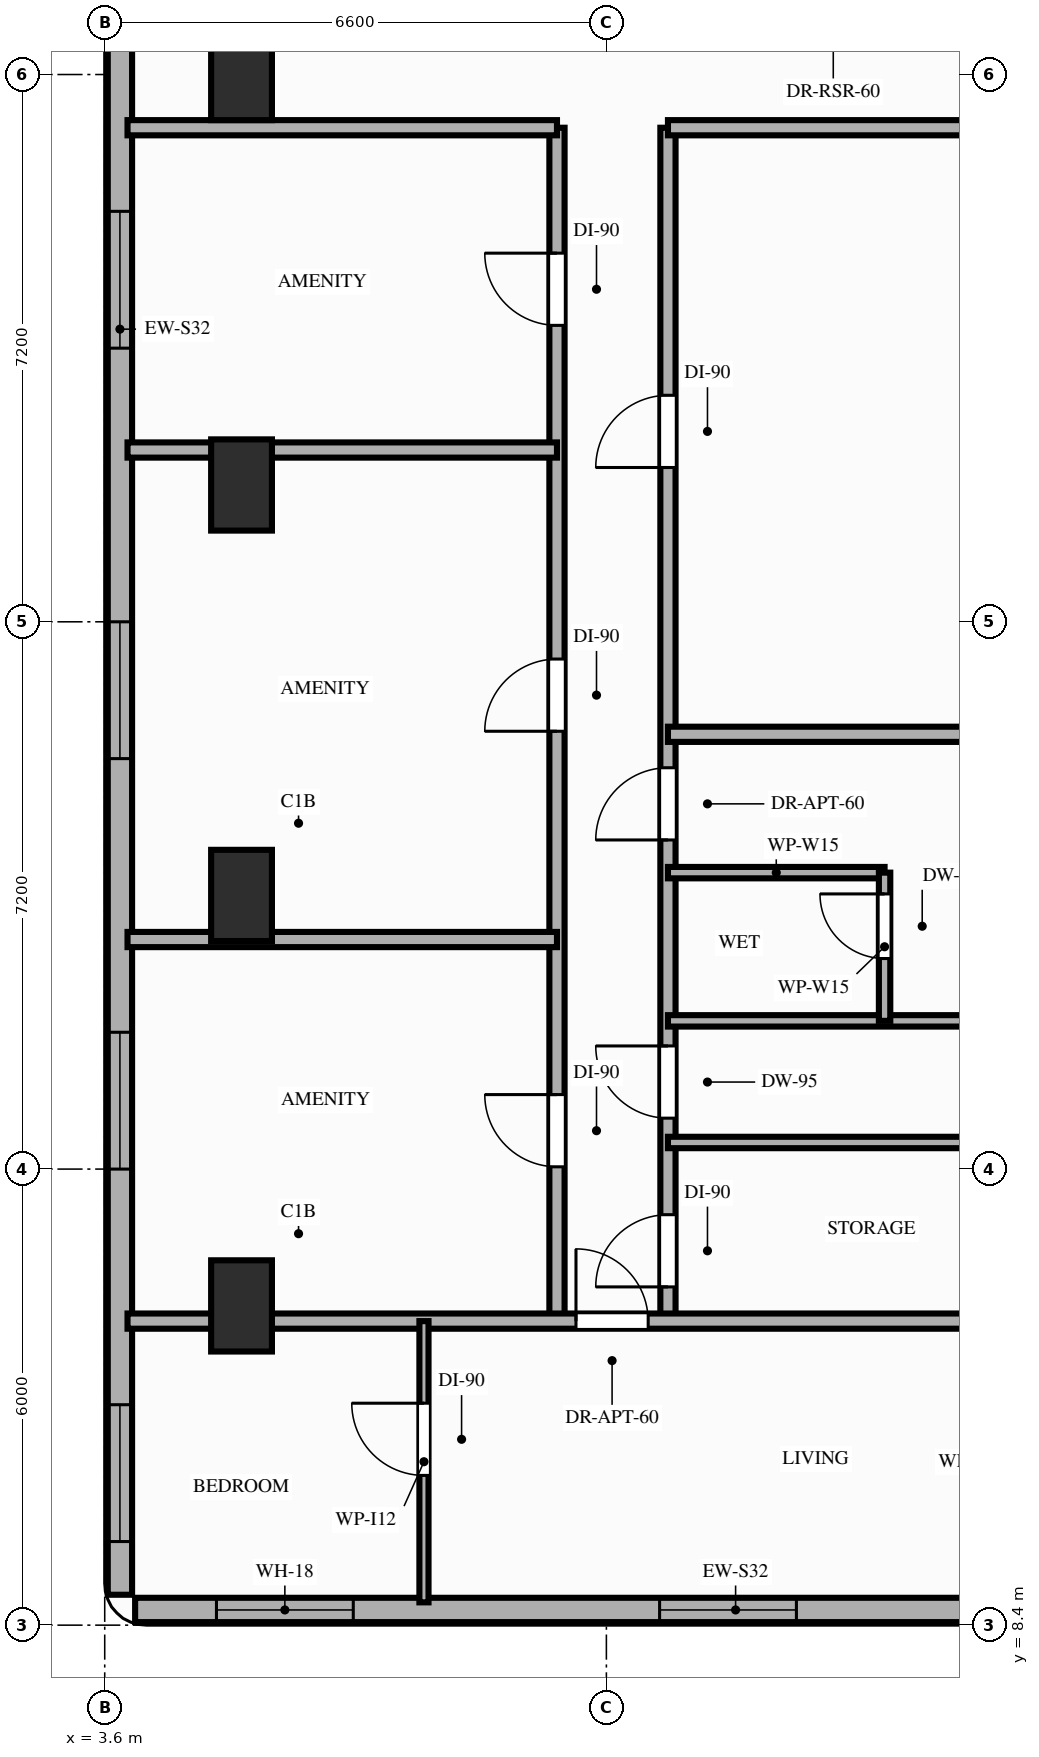
"""IFC4 building model, lengths in metres.
Left out: names, types, materials, properties, quantities, classifications, styles, units other than length and angle.
Written with IfcOpenShell. Run it as: python <this file> out.ifc"""

import sys

from ifc_helpers import new_model, si_unit, direction, frame, frame_2d, origin, origin_2d, place, context, subcontext, project, spatial, rectangle, extrude, element, fill, save


model = new_model("IFC4")
c1 = context("Model", 3, precision=1e-05, world=origin(), true_north=direction((0.0, 1.0)))
c2 = subcontext(c1, "Body", "Model", "MODEL_VIEW")
j1 = project(units=[si_unit("LENGTHUNIT", "METRE"), si_unit("PLANEANGLEUNIT", "RADIAN")], contexts=[c1])
p1 = place(None, origin())
s1 = spatial("IfcSite", under=j1, at=p1, CompositionType="ELEMENT")
p2 = place(p1, origin())
s2 = spatial("IfcBuilding", under=s1, at=p2, CompositionType="ELEMENT")
p3 = place(p2, frame((0.0, 0.0, 102.6)))
s3 = spatial("IfcBuildingStorey", under=s2, at=p3, CompositionType="ELEMENT", Elevation=102.6)
for number, where, z_axis, x_axis in (
    (1, (5.4, 12.6, 0.0), (0.0, 0.0, 1.0), (1.0, 0.0, 0.0)),
    (2, (5.4, 18.0, 0.0), (0.0, 0.0, 1.0), (1.0, 0.0, 0.0)),
    (3, (5.4, 23.4, 0.0), (0.0, 0.0, 1.0), (1.0, 0.0, 0.0)),
    (4, (5.4, 28.8, 0.0), (0.0, 0.0, 1.0), (1.0, 0.0, 0.0)),
):
    element("IfcColumn", number, at=place(p3, frame(where, z_axis=z_axis, x_axis=x_axis)), inside=s3, PredefinedType="COLUMN", context=c2, shape_type="SweptSolid", body=[
        extrude(rectangle(XDim=0.8, YDim=1.2, at=origin_2d()), origin(), (0.0, 0.0, 1.0), 4.8),
    ])
p4 = place(p3, frame((4.0, 8.6, 0.0), z_axis=(0.0, 0.0, 1.0), x_axis=(1.0, 0.0, 0.0)))
e5 = element("IfcWall", 5, at=p4, inside=s3, PredefinedType="STANDARD", context=c2, shape_type="SweptSolid", body=[
    extrude(rectangle(XDim=15.8, YDim=0.32, at=frame_2d((7.9, 0.0))), origin(), (0.0, 0.0, 1.0), 4.56),
])
p5 = place(p4, frame((1.07, 0.0, 0.85)))
e6 = element("IfcOpeningElement", 6, at=p5, cuts=e5, PredefinedType="OPENING", context=c2, shape_type="SweptSolid", body=[
    extrude(rectangle(XDim=1.8, YDim=1.75, at=frame_2d((0.9, 0.875))), frame((0.0, 0.17, 0.0), z_axis=(0.0, -1.0, 0.0), x_axis=(1.0, 0.0, 0.0)), (0.0, 0.0, 1.0), 0.34),
])
p6 = place(p4, frame((6.9, 0.0, 0.85)))
e7 = element("IfcOpeningElement", 7, at=p6, cuts=e5, PredefinedType="OPENING", context=c2, shape_type="SweptSolid", body=[
    extrude(rectangle(XDim=1.8, YDim=1.75, at=frame_2d((0.9, 0.875))), frame((0.0, 0.17, 0.0), z_axis=(0.0, -1.0, 0.0), x_axis=(1.0, 0.0, 0.0)), (0.0, 0.0, 1.0), 0.34),
])
p7 = place(p3, frame((3.8, 42.1, 0.0), z_axis=(0.0, 0.0, 1.0), x_axis=(0.0, -1.0, 0.0)))
e8 = element("IfcWall", 8, at=p7, inside=s3, PredefinedType="STANDARD", context=c2, shape_type="SweptSolid", body=[
    extrude(rectangle(XDim=33.3, YDim=0.32, at=frame_2d((16.65, 0.0))), origin(), (0.0, 0.0, 1.0), 4.26),
])
p8 = place(p7, frame((30.8, 0.0, 0.85)))
e9 = element("IfcOpeningElement", 9, at=p8, cuts=e8, PredefinedType="OPENING", context=c2, shape_type="SweptSolid", body=[
    extrude(rectangle(XDim=1.8, YDim=1.75, at=frame_2d((0.9, 0.875))), frame((0.0, 0.17, 0.0), z_axis=(0.0, -1.0, 0.0), x_axis=(1.0, 0.0, 0.0)), (0.0, 0.0, 1.0), 0.34),
])
p9 = place(p7, frame((25.9, 0.0, 0.85)))
e10 = element("IfcOpeningElement", 10, at=p9, cuts=e8, PredefinedType="OPENING", context=c2, shape_type="SweptSolid", body=[
    extrude(rectangle(XDim=1.8, YDim=1.75, at=frame_2d((0.9, 0.875))), frame((0.0, 0.17, 0.0), z_axis=(0.0, -1.0, 0.0), x_axis=(1.0, 0.0, 0.0)), (0.0, 0.0, 1.0), 0.34),
])
p10 = place(p7, frame((20.5, 0.0, 0.85)))
e11 = element("IfcOpeningElement", 11, at=p10, cuts=e8, PredefinedType="OPENING", context=c2, shape_type="SweptSolid", body=[
    extrude(rectangle(XDim=1.8, YDim=1.75, at=frame_2d((0.9, 0.875))), frame((0.0, 0.17, 0.0), z_axis=(0.0, -1.0, 0.0), x_axis=(1.0, 0.0, 0.0)), (0.0, 0.0, 1.0), 0.34),
])
p11 = place(p7, frame((15.1, 0.0, 0.85)))
e12 = element("IfcOpeningElement", 12, at=p11, cuts=e8, PredefinedType="OPENING", context=c2, shape_type="SweptSolid", body=[
    extrude(rectangle(XDim=1.8, YDim=1.75, at=frame_2d((0.9, 0.875))), frame((0.0, 0.17, 0.0), z_axis=(0.0, -1.0, 0.0), x_axis=(1.0, 0.0, 0.0)), (0.0, 0.0, 1.0), 0.34),
])
p12 = place(p7, frame((9.9, 0.0, 0.85)))
e13 = element("IfcOpeningElement", 13, at=p12, cuts=e8, PredefinedType="OPENING", context=c2, shape_type="SweptSolid", body=[
    extrude(rectangle(XDim=1.8, YDim=1.75, at=frame_2d((0.9, 0.875))), frame((0.0, 0.17, 0.0), z_axis=(0.0, -1.0, 0.0), x_axis=(1.0, 0.0, 0.0)), (0.0, 0.0, 1.0), 0.34),
])
p13 = place(p7, frame((3.8, 0.0, 0.85)))
e14 = element("IfcOpeningElement", 14, at=p13, cuts=e8, PredefinedType="OPENING", context=c2, shape_type="SweptSolid", body=[
    extrude(rectangle(XDim=1.8, YDim=1.75, at=frame_2d((0.9, 0.875))), frame((0.0, 0.17, 0.0), z_axis=(0.0, -1.0, 0.0), x_axis=(1.0, 0.0, 0.0)), (0.0, 0.0, 1.0), 0.34),
])
p14 = place(p3, frame((9.55, 12.4, 0.0), z_axis=(0.0, 0.0, 1.0), x_axis=(0.0, 1.0, 0.0)))
e15 = element("IfcWall", 15, at=p14, inside=s3, PredefinedType="PARTITIONING", context=c2, shape_type="SweptSolid", body=[
    extrude(rectangle(XDim=15.7, YDim=0.2, at=frame_2d((7.85, 0.0))), origin(), (0.0, 0.0, 1.0), 3.95),
])
p15 = place(p14, frame((2.03, 0.0, 0.0)))
e16 = element("IfcOpeningElement", 16, at=p15, cuts=e15, PredefinedType="OPENING", context=c2, shape_type="SweptSolid", body=[
    extrude(rectangle(XDim=0.95, YDim=2.15, at=frame_2d((0.475, 1.075))), frame((0.0, 0.11, 0.0), z_axis=(0.0, -1.0, 0.0), x_axis=(1.0, 0.0, 0.0)), (0.0, 0.0, 1.0), 0.22),
])
p16 = place(p14, frame((7.76, 0.0, 0.0)))
e17 = element("IfcOpeningElement", 17, at=p16, cuts=e15, PredefinedType="OPENING", context=c2, shape_type="SweptSolid", body=[
    extrude(rectangle(XDim=0.95, YDim=2.15, at=frame_2d((0.475, 1.075))), frame((0.0, 0.11, 0.0), z_axis=(0.0, -1.0, 0.0), x_axis=(1.0, 0.0, 0.0)), (0.0, 0.0, 1.0), 0.22),
])
p17 = place(p14, frame((13.1, 0.0, 0.0)))
e18 = element("IfcOpeningElement", 18, at=p17, cuts=e15, PredefinedType="OPENING", context=c2, shape_type="SweptSolid", body=[
    extrude(rectangle(XDim=0.95, YDim=2.15, at=frame_2d((0.475, 1.075))), frame((0.0, 0.11, 0.0), z_axis=(0.0, -1.0, 0.0), x_axis=(1.0, 0.0, 0.0)), (0.0, 0.0, 1.0), 0.22),
])
p18 = place(p3, frame((11.01, 12.4, 0.0), z_axis=(0.0, 0.0, 1.0), x_axis=(0.0, 1.0, 0.0)))
e19 = element("IfcWall", 19, at=p18, inside=s3, PredefinedType="PARTITIONING", context=c2, shape_type="SweptSolid", body=[
    extrude(rectangle(XDim=15.7, YDim=0.2, at=frame_2d((7.85, 0.0))), origin(), (0.0, 0.0, 1.0), 3.95),
])
p19 = place(p18, frame((0.45, 0.0, 0.0)))
e20 = element("IfcOpeningElement", 20, at=p19, cuts=e19, PredefinedType="OPENING", context=c2, shape_type="SweptSolid", body=[
    extrude(rectangle(XDim=0.95, YDim=2.15, at=frame_2d((0.475, 1.075))), frame((0.0, 0.11, 0.0), z_axis=(0.0, -1.0, 0.0), x_axis=(1.0, 0.0, 0.0)), (0.0, 0.0, 1.0), 0.22),
])
p20 = place(p18, frame((2.67, 0.0, 0.0)))
e21 = element("IfcOpeningElement", 21, at=p20, cuts=e19, PredefinedType="OPENING", context=c2, shape_type="SweptSolid", body=[
    extrude(rectangle(XDim=0.95, YDim=2.1, at=frame_2d((0.475, 1.05))), frame((0.0, 0.11, 0.0), z_axis=(0.0, -1.0, 0.0), x_axis=(1.0, 0.0, 0.0)), (0.0, 0.0, 1.0), 0.22),
])
p21 = place(p18, frame((11.23, 0.0, 0.0)))
e22 = element("IfcOpeningElement", 22, at=p21, cuts=e19, PredefinedType="OPENING", context=c2, shape_type="SweptSolid", body=[
    extrude(rectangle(XDim=0.95, YDim=2.15, at=frame_2d((0.475, 1.075))), frame((0.0, 0.11, 0.0), z_axis=(0.0, -1.0, 0.0), x_axis=(1.0, 0.0, 0.0)), (0.0, 0.0, 1.0), 0.22),
])
p22 = place(p18, frame((6.33, 0.0, 0.0)))
e23 = element("IfcOpeningElement", 23, at=p22, cuts=e19, PredefinedType="OPENING", context=c2, shape_type="SweptSolid", body=[
    extrude(rectangle(XDim=0.95, YDim=2.15, at=frame_2d((0.475, 1.075))), frame((0.0, 0.11, 0.0), z_axis=(0.0, -1.0, 0.0), x_axis=(1.0, 0.0, 0.0)), (0.0, 0.0, 1.0), 0.22),
])
p23 = place(p3, frame((3.9, 12.4, 0.0), z_axis=(0.0, 0.0, 1.0), x_axis=(1.0, 0.0, 0.0)))
e24 = element("IfcWall", 24, at=p23, inside=s3, PredefinedType="PARTITIONING", context=c2, shape_type="SweptSolid", body=[
    extrude(rectangle(XDim=16.0, YDim=0.2, at=frame_2d((8.0, 0.0))), origin(), (0.0, 0.0, 1.0), 3.95),
])
p24 = place(p23, frame((5.9, 0.0, 0.0)))
e25 = element("IfcOpeningElement", 25, at=p24, cuts=e24, PredefinedType="OPENING", context=c2, shape_type="SweptSolid", body=[
    extrude(rectangle(XDim=0.95, YDim=2.15, at=frame_2d((0.475, 1.075))), frame((0.0, 0.11, 0.0), z_axis=(0.0, -1.0, 0.0), x_axis=(1.0, 0.0, 0.0)), (0.0, 0.0, 1.0), 0.22),
])
p25 = place(p3, frame((3.9, 28.1, 0.0), z_axis=(0.0, 0.0, 1.0), x_axis=(1.0, 0.0, 0.0)))
e26 = element("IfcWall", 26, at=p25, inside=s3, PredefinedType="PARTITIONING", context=c2, shape_type="SweptSolid", body=[
    extrude(rectangle(XDim=5.65, YDim=0.2, at=frame_2d((2.825, 0.0))), origin(), (0.0, 0.0, 1.0), 3.95),
])
p26 = place(p3, frame((11.01, 28.1, 0.0), z_axis=(0.0, 0.0, 1.0), x_axis=(1.0, 0.0, 0.0)))
e27 = element("IfcWall", 27, at=p26, inside=s3, PredefinedType="PARTITIONING", context=c2, shape_type="SweptSolid", body=[
    extrude(rectangle(XDim=8.89, YDim=0.2, at=frame_2d((4.445, 0.0))), origin(), (0.0, 0.0, 1.0), 3.95),
])
for number, where, z_axis, x_axis in (
    (28, (3.9, 17.42, 0.0), (0.0, 0.0, 1.0), (1.0, 0.0, 0.0)),
    (29, (3.9, 23.86, 0.0), (0.0, 0.0, 1.0), (1.0, 0.0, 0.0)),
):
    element("IfcWall", number, at=place(p3, frame(where, z_axis=z_axis, x_axis=x_axis)), inside=s3, PredefinedType="PARTITIONING", context=c2, shape_type="SweptSolid", body=[
        extrude(rectangle(XDim=5.65, YDim=0.2, at=frame_2d((2.825, 0.0))), origin(), (0.0, 0.0, 1.0), 3.95),
    ])
p27 = place(p3, frame((7.8, 8.7, 0.0), z_axis=(0.0, 0.0, 1.0), x_axis=(0.0, 1.0, 0.0)))
e30 = element("IfcWall", 30, at=p27, inside=s3, PredefinedType="PARTITIONING", context=c2, shape_type="SweptSolid", body=[
    extrude(rectangle(XDim=3.7, YDim=0.12, at=frame_2d((1.85, 0.0))), origin(), (0.0, 0.0, 1.0), 3.95),
])
p28 = place(p27, frame((1.67, 0.0, 0.0)))
e31 = element("IfcOpeningElement", 31, at=p28, cuts=e30, PredefinedType="OPENING", context=c2, shape_type="SweptSolid", body=[
    extrude(rectangle(XDim=0.95, YDim=2.15, at=frame_2d((0.475, 1.075))), frame((0.0, 0.07, 0.0), z_axis=(0.0, -1.0, 0.0), x_axis=(1.0, 0.0, 0.0)), (0.0, 0.0, 1.0), 0.14),
])
for number, where, z_axis, x_axis in (
    (32, (11.01, 14.75, 0.0), (0.0, 0.0, 1.0), (1.0, 0.0, 0.0)),
    (33, (11.01, 16.35, 0.0), (0.0, 0.0, 1.0), (1.0, 0.0, 0.0)),
):
    element("IfcWall", number, at=place(p3, frame(where, z_axis=z_axis, x_axis=x_axis)), inside=s3, PredefinedType="PARTITIONING", context=c2, shape_type="SweptSolid", body=[
        extrude(rectangle(XDim=8.89, YDim=0.15, at=frame_2d((4.445, 0.0))), origin(), (0.0, 0.0, 1.0), 3.95),
    ])
p29 = place(p3, frame((11.01, 20.12, 0.0), z_axis=(0.0, 0.0, 1.0), x_axis=(1.0, 0.0, 0.0)))
e34 = element("IfcWall", 34, at=p29, inside=s3, PredefinedType="PARTITIONING", context=c2, shape_type="SweptSolid", body=[
    extrude(rectangle(XDim=8.89, YDim=0.2, at=frame_2d((4.445, 0.0))), origin(), (0.0, 0.0, 1.0), 3.95),
])
p30 = place(p3, frame((11.01, 18.3, 0.0), z_axis=(0.0, 0.0, 1.0), x_axis=(1.0, 0.0, 0.0)))
e35 = element("IfcWall", 35, at=p30, inside=s3, PredefinedType="PARTITIONING", context=c2, shape_type="SweptSolid", body=[
    extrude(rectangle(XDim=2.85, YDim=0.15, at=frame_2d((1.425, 0.0))), origin(), (0.0, 0.0, 1.0), 3.95),
])
p31 = place(p3, frame((13.86, 16.35, 0.0), z_axis=(0.0, 0.0, 1.0), x_axis=(0.0, 1.0, 0.0)))
e36 = element("IfcWall", 36, at=p31, inside=s3, PredefinedType="PARTITIONING", context=c2, shape_type="SweptSolid", body=[
    extrude(rectangle(XDim=1.95, YDim=0.15, at=frame_2d((0.975, 0.0))), origin(), (0.0, 0.0, 1.0), 3.95),
])
p32 = place(p31, frame((0.82, 0.0, 0.0)))
e37 = element("IfcOpeningElement", 37, at=p32, cuts=e36, PredefinedType="OPENING", context=c2, shape_type="SweptSolid", body=[
    extrude(rectangle(XDim=0.85, YDim=2.1, at=frame_2d((0.425, 1.05))), frame((0.0, 0.085, 0.0), z_axis=(0.0, -1.0, 0.0), x_axis=(1.0, 0.0, 0.0)), (0.0, 0.0, 1.0), 0.17),
])
p33 = place(p5, origin())
e38 = element("IfcWindow", 38, at=p33, inside=s3, PartitioningType="SINGLE_PANEL", PredefinedType="WINDOW", context=c2, shape_type="SweptSolid", body=[
    extrude(rectangle(XDim=1.8, YDim=1.75, at=frame_2d((0.9, 0.875))), frame((0.0, 0.03, 0.0), z_axis=(0.0, -1.0, 0.0), x_axis=(1.0, 0.0, 0.0)), (0.0, 0.0, 1.0), 0.06),
])
fill(e6, e38)
p34 = place(p6, origin())
e39 = element("IfcWindow", 39, at=p34, inside=s3, PartitioningType="SINGLE_PANEL", PredefinedType="WINDOW", context=c2, shape_type="SweptSolid", body=[
    extrude(rectangle(XDim=1.8, YDim=1.75, at=frame_2d((0.9, 0.875))), frame((0.0, 0.03, 0.0), z_axis=(0.0, -1.0, 0.0), x_axis=(1.0, 0.0, 0.0)), (0.0, 0.0, 1.0), 0.06),
])
fill(e7, e39)
p35 = place(p8, origin())
e40 = element("IfcWindow", 40, at=p35, inside=s3, PartitioningType="SINGLE_PANEL", PredefinedType="WINDOW", context=c2, shape_type="SweptSolid", body=[
    extrude(rectangle(XDim=1.8, YDim=1.75, at=frame_2d((0.9, 0.875))), frame((0.0, 0.03, 0.0), z_axis=(0.0, -1.0, 0.0), x_axis=(1.0, 0.0, 0.0)), (0.0, 0.0, 1.0), 0.06),
])
fill(e9, e40)
p36 = place(p9, origin())
e41 = element("IfcWindow", 41, at=p36, inside=s3, PartitioningType="SINGLE_PANEL", PredefinedType="WINDOW", context=c2, shape_type="SweptSolid", body=[
    extrude(rectangle(XDim=1.8, YDim=1.75, at=frame_2d((0.9, 0.875))), frame((0.0, 0.03, 0.0), z_axis=(0.0, -1.0, 0.0), x_axis=(1.0, 0.0, 0.0)), (0.0, 0.0, 1.0), 0.06),
])
fill(e10, e41)
p37 = place(p10, origin())
e42 = element("IfcWindow", 42, at=p37, inside=s3, PartitioningType="SINGLE_PANEL", PredefinedType="WINDOW", context=c2, shape_type="SweptSolid", body=[
    extrude(rectangle(XDim=1.8, YDim=1.75, at=frame_2d((0.9, 0.875))), frame((0.0, 0.03, 0.0), z_axis=(0.0, -1.0, 0.0), x_axis=(1.0, 0.0, 0.0)), (0.0, 0.0, 1.0), 0.06),
])
fill(e11, e42)
p38 = place(p11, origin())
e43 = element("IfcWindow", 43, at=p38, inside=s3, PartitioningType="SINGLE_PANEL", PredefinedType="WINDOW", context=c2, shape_type="SweptSolid", body=[
    extrude(rectangle(XDim=1.8, YDim=1.75, at=frame_2d((0.9, 0.875))), frame((0.0, 0.03, 0.0), z_axis=(0.0, -1.0, 0.0), x_axis=(1.0, 0.0, 0.0)), (0.0, 0.0, 1.0), 0.06),
])
fill(e12, e43)
p39 = place(p15, origin())
e44 = element("IfcDoor", 44, at=p39, inside=s3, OperationType="SINGLE_SWING_RIGHT", PredefinedType="DOOR", context=c2, shape_type="SweptSolid", body=[
    extrude(rectangle(XDim=0.95, YDim=2.15, at=frame_2d((0.475, 1.075))), frame((0.0, 0.025, 0.0), z_axis=(0.0, -1.0, 0.0), x_axis=(1.0, 0.0, 0.0)), (0.0, 0.0, 1.0), 0.05),
])
fill(e16, e44)
p40 = place(p16, origin())
e45 = element("IfcDoor", 45, at=p40, inside=s3, OperationType="SINGLE_SWING_LEFT", PredefinedType="DOOR", context=c2, shape_type="SweptSolid", body=[
    extrude(rectangle(XDim=0.95, YDim=2.15, at=frame_2d((0.475, 1.075))), frame((0.0, 0.025, 0.0), z_axis=(0.0, -1.0, 0.0), x_axis=(1.0, 0.0, 0.0)), (0.0, 0.0, 1.0), 0.05),
])
fill(e17, e45)
p41 = place(p17, origin())
e46 = element("IfcDoor", 46, at=p41, inside=s3, OperationType="SINGLE_SWING_RIGHT", PredefinedType="DOOR", context=c2, shape_type="SweptSolid", body=[
    extrude(rectangle(XDim=0.95, YDim=2.15, at=frame_2d((0.475, 1.075))), frame((0.0, 0.025, 0.0), z_axis=(0.0, -1.0, 0.0), x_axis=(1.0, 0.0, 0.0)), (0.0, 0.0, 1.0), 0.05),
])
fill(e18, e46)
p42 = place(p24, origin())
e47 = element("IfcDoor", 47, at=p42, inside=s3, OperationType="SINGLE_SWING_LEFT", PredefinedType="DOOR", context=c2, shape_type="SweptSolid", body=[
    extrude(rectangle(XDim=0.95, YDim=2.15, at=frame_2d((0.475, 1.075))), frame((0.0, 0.025, 0.0), z_axis=(0.0, -1.0, 0.0), x_axis=(1.0, 0.0, 0.0)), (0.0, 0.0, 1.0), 0.05),
])
fill(e25, e47)
p43 = place(p28, origin())
e48 = element("IfcDoor", 48, at=p43, inside=s3, OperationType="SINGLE_SWING_RIGHT", PredefinedType="DOOR", context=c2, shape_type="SweptSolid", body=[
    extrude(rectangle(XDim=0.95, YDim=2.15, at=frame_2d((0.475, 1.075))), frame((0.0, 0.025, 0.0), z_axis=(0.0, -1.0, 0.0), x_axis=(1.0, 0.0, 0.0)), (0.0, 0.0, 1.0), 0.05),
])
fill(e31, e48)
p44 = place(p19, origin())
e49 = element("IfcDoor", 49, at=p44, inside=s3, OperationType="SINGLE_SWING_LEFT", PredefinedType="DOOR", context=c2, shape_type="SweptSolid", body=[
    extrude(rectangle(XDim=0.95, YDim=2.15, at=frame_2d((0.475, 1.075))), frame((0.0, 0.025, 0.0), z_axis=(0.0, -1.0, 0.0), x_axis=(1.0, 0.0, 0.0)), (0.0, 0.0, 1.0), 0.05),
])
fill(e20, e49)
p45 = place(p20, origin())
e50 = element("IfcDoor", 50, at=p45, inside=s3, OperationType="SINGLE_SWING_RIGHT", PredefinedType="DOOR", context=c2, shape_type="SweptSolid", body=[
    extrude(rectangle(XDim=0.95, YDim=2.1, at=frame_2d((0.475, 1.05))), frame((0.0, 0.025, 0.0), z_axis=(0.0, -1.0, 0.0), x_axis=(1.0, 0.0, 0.0)), (0.0, 0.0, 1.0), 0.05),
])
fill(e21, e50)
p46 = place(p21, origin())
e51 = element("IfcDoor", 51, at=p46, inside=s3, OperationType="SINGLE_SWING_LEFT", PredefinedType="DOOR", context=c2, shape_type="SweptSolid", body=[
    extrude(rectangle(XDim=0.95, YDim=2.15, at=frame_2d((0.475, 1.075))), frame((0.0, 0.025, 0.0), z_axis=(0.0, -1.0, 0.0), x_axis=(1.0, 0.0, 0.0)), (0.0, 0.0, 1.0), 0.05),
])
fill(e22, e51)
p47 = place(p32, origin())
e52 = element("IfcDoor", 52, at=p47, inside=s3, OperationType="SINGLE_SWING_RIGHT", PredefinedType="DOOR", context=c2, shape_type="SweptSolid", body=[
    extrude(rectangle(XDim=0.85, YDim=2.1, at=frame_2d((0.425, 1.05))), frame((0.0, 0.025, 0.0), z_axis=(0.0, -1.0, 0.0), x_axis=(1.0, 0.0, 0.0)), (0.0, 0.0, 1.0), 0.05),
])
fill(e37, e52)
p48 = place(p22, origin())
e53 = element("IfcDoor", 53, at=p48, inside=s3, OperationType="SINGLE_SWING_LEFT", PredefinedType="DOOR", context=c2, shape_type="SweptSolid", body=[
    extrude(rectangle(XDim=0.95, YDim=2.15, at=frame_2d((0.475, 1.075))), frame((0.0, 0.025, 0.0), z_axis=(0.0, -1.0, 0.0), x_axis=(1.0, 0.0, 0.0)), (0.0, 0.0, 1.0), 0.05),
])
fill(e23, e53)
save(model, sys.argv[1])
